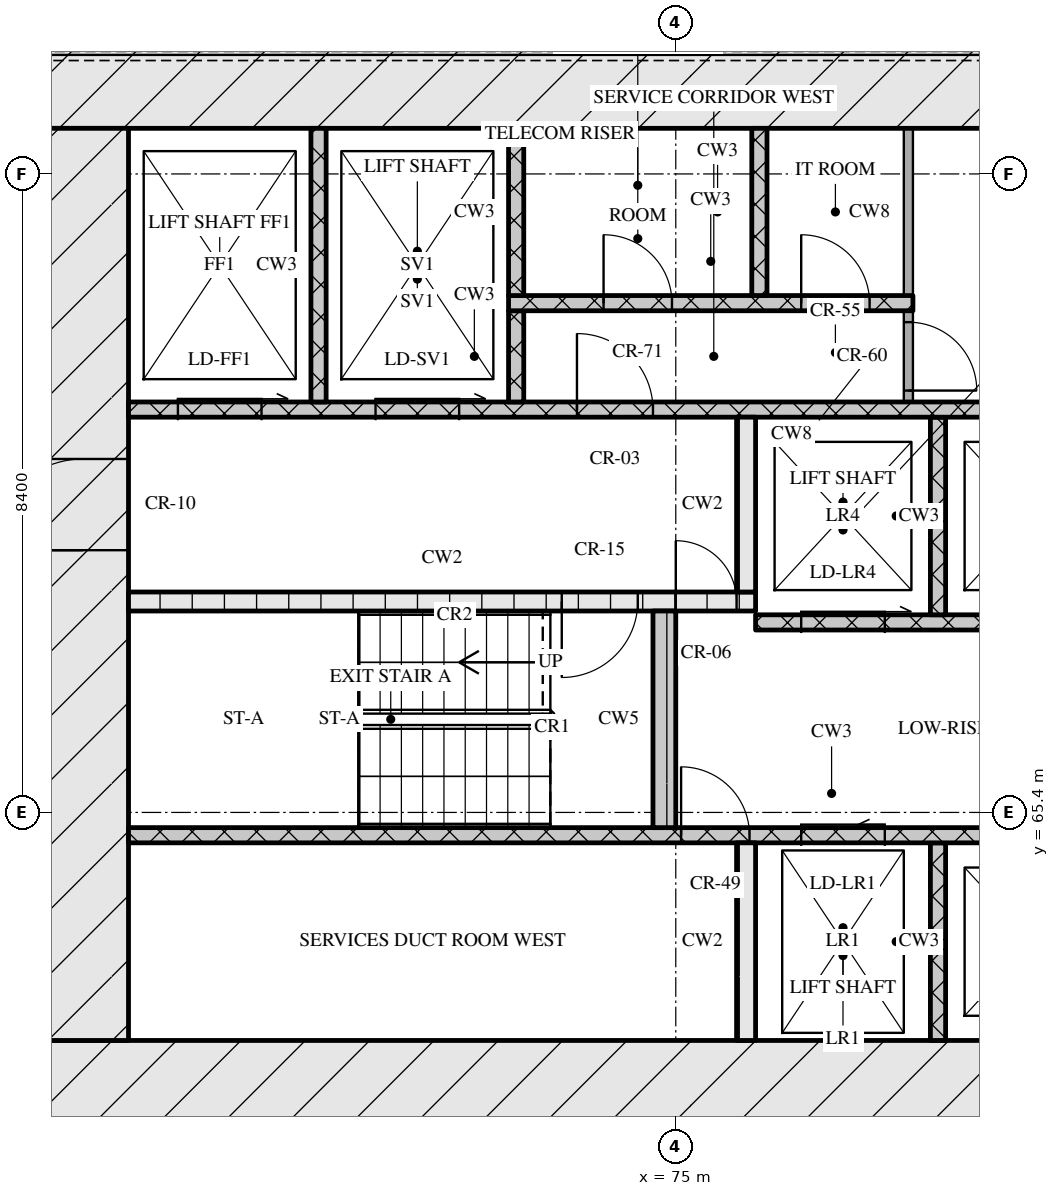
"""IFC4 building model, lengths in metres.
Left out: names, types, materials, properties, quantities, classifications, styles, units other than length and angle.
Written with IfcOpenShell. Run it as: python <this file> out.ifc"""

import sys

from ifc_helpers import new_model, si_unit, direction, frame, frame_2d, origin, place, context, subcontext, project, spatial, rectangle, extrude, element, fill, save


model = new_model("IFC4")
c1 = context("Model", 3, precision=1e-05, world=origin(), true_north=direction((0.0, 1.0)))
c2 = subcontext(c1, "Body", "Model", "MODEL_VIEW")
j1 = project(units=[si_unit("LENGTHUNIT", "METRE"), si_unit("PLANEANGLEUNIT", "RADIAN")], contexts=[c1])
p1 = place(None, origin())
s1 = spatial("IfcSite", under=j1, at=p1, CompositionType="ELEMENT")
p2 = place(p1, origin())
s2 = spatial("IfcBuilding", under=s1, at=p2, CompositionType="ELEMENT")
p3 = place(p2, frame((0.0, 0.0, 73.2)))
s3 = spatial("IfcBuildingStorey", under=s2, at=p3, CompositionType="ELEMENT", Elevation=73.2)
p4 = place(p3, frame((66.6, 61.8, 0.0), z_axis=(0.0, 0.0, 1.0), x_axis=(1.0, 0.0, 0.0)))
e1 = element("IfcWall", 1, at=p4, inside=s3, PredefinedType="SOLIDWALL", context=c2, shape_type="SweptSolid", body=[
    extrude(rectangle(XDim=42.0, YDim=1.2, at=frame_2d((21.0, 0.0))), origin(), (0.0, 0.0, 1.0), 3.32),
])
p5 = place(p4, frame((21.35, 0.0, 0.0)))
e2 = element("IfcOpeningElement", 2, at=p5, cuts=e1, PredefinedType="OPENING", context=c2, shape_type="SweptSolid", body=[
    extrude(rectangle(XDim=1.8, YDim=2.1, at=frame_2d((0.9, 1.05))), frame((0.0, 0.61, 0.0), z_axis=(0.0, -1.0, 0.0), x_axis=(1.0, 0.0, 0.0)), (0.0, 0.0, 1.0), 1.22),
])
p6 = place(p3, frame((66.6, 75.0, 0.0), z_axis=(0.0, 0.0, 1.0), x_axis=(1.0, 0.0, 0.0)))
e3 = element("IfcWall", 3, at=p6, inside=s3, PredefinedType="SOLIDWALL", context=c2, shape_type="SweptSolid", body=[
    extrude(rectangle(XDim=42.0, YDim=1.2, at=frame_2d((21.0, 0.0))), origin(), (0.0, 0.0, 1.0), 3.32),
])
p7 = place(p3, frame((67.2, 62.4, 0.0), z_axis=(0.0, 0.0, 1.0), x_axis=(0.0, 1.0, 0.0)))
e4 = element("IfcWall", 4, at=p7, inside=s3, PredefinedType="SOLIDWALL", context=c2, shape_type="SweptSolid", body=[
    extrude(rectangle(XDim=12.0, YDim=1.2, at=frame_2d((6.0, 0.0))), origin(), (0.0, 0.0, 1.0), 3.32),
])
p8 = place(p7, frame((6.45, 0.0, 0.0)))
e5 = element("IfcOpeningElement", 5, at=p8, cuts=e4, PredefinedType="OPENING", context=c2, shape_type="SweptSolid", body=[
    extrude(rectangle(XDim=1.2, YDim=2.1, at=frame_2d((0.6, 1.05))), frame((0.0, 0.61, 0.0), z_axis=(0.0, -1.0, 0.0), x_axis=(1.0, 0.0, 0.0)), (0.0, 0.0, 1.0), 1.22),
])
p9 = place(p3, frame((75.925, 62.4, 0.0), z_axis=(0.0, 0.0, 1.0), x_axis=(0.0, 1.0, 0.0)))
e6 = element("IfcWall", 6, at=p9, inside=s3, PredefinedType="SOLIDWALL", context=c2, shape_type="SweptSolid", body=[
    extrude(rectangle(XDim=2.6, YDim=0.25, at=frame_2d((1.3, 0.0))), origin(), (0.0, 0.0, 1.0), 3.32),
])
p10 = place(p3, frame((78.45, 62.4, 0.0), z_axis=(0.0, 0.0, 1.0), x_axis=(0.0, 1.0, 0.0)))
e7 = element("IfcWall", 7, at=p10, inside=s3, PredefinedType="SOLIDWALL", context=c2, shape_type="SweptSolid", body=[
    extrude(rectangle(XDim=2.6, YDim=0.2, at=frame_2d((1.3, 0.0))), origin(), (0.0, 0.0, 1.0), 3.32),
])
p11 = place(p3, frame((67.8, 65.1, 0.0), z_axis=(0.0, 0.0, 1.0), x_axis=(1.0, 0.0, 0.0)))
e8 = element("IfcWall", 8, at=p11, inside=s3, PredefinedType="SOLIDWALL", context=c2, shape_type="SweptSolid", body=[
    extrude(rectangle(XDim=18.5, YDim=0.2, at=frame_2d((9.25, 0.0))), origin(), (0.0, 0.0, 1.0), 3.32),
])
p12 = place(p11, frame((7.27, 0.0, 0.0)))
e9 = element("IfcOpeningElement", 9, at=p12, cuts=e8, PredefinedType="OPENING", context=c2, shape_type="SweptSolid", body=[
    extrude(rectangle(XDim=0.9, YDim=2.1, at=frame_2d((0.45, 1.05))), frame((0.0, 0.11, 0.0), z_axis=(0.0, -1.0, 0.0), x_axis=(1.0, 0.0, 0.0)), (0.0, 0.0, 1.0), 0.22),
])
p13 = place(p11, frame((8.85, 0.0, 0.0)))
e10 = element("IfcOpeningElement", 10, at=p13, cuts=e8, PredefinedType="OPENING", context=c2, shape_type="SweptSolid", body=[
    extrude(rectangle(XDim=1.1, YDim=2.1, at=frame_2d((0.55, 1.05))), frame((0.0, 0.11, 0.0), z_axis=(0.0, -1.0, 0.0), x_axis=(1.0, 0.0, 0.0)), (0.0, 0.0, 1.0), 0.22),
])
p14 = place(p11, frame((11.35, 0.0, 0.0)))
e11 = element("IfcOpeningElement", 11, at=p14, cuts=e8, PredefinedType="OPENING", context=c2, shape_type="SweptSolid", body=[
    extrude(rectangle(XDim=1.1, YDim=2.1, at=frame_2d((0.55, 1.05))), frame((0.0, 0.11, 0.0), z_axis=(0.0, -1.0, 0.0), x_axis=(1.0, 0.0, 0.0)), (0.0, 0.0, 1.0), 0.22),
])
p15 = place(p11, frame((13.85, 0.0, 0.0)))
e12 = element("IfcOpeningElement", 12, at=p15, cuts=e8, PredefinedType="OPENING", context=c2, shape_type="SweptSolid", body=[
    extrude(rectangle(XDim=1.1, YDim=2.1, at=frame_2d((0.55, 1.05))), frame((0.0, 0.11, 0.0), z_axis=(0.0, -1.0, 0.0), x_axis=(1.0, 0.0, 0.0)), (0.0, 0.0, 1.0), 0.22),
])
p16 = place(p11, frame((16.7, 0.0, 0.0)))
e13 = element("IfcOpeningElement", 13, at=p16, cuts=e8, PredefinedType="OPENING", context=c2, shape_type="SweptSolid", body=[
    extrude(rectangle(XDim=0.9, YDim=2.1, at=frame_2d((0.45, 1.05))), frame((0.0, 0.11, 0.0), z_axis=(0.0, -1.0, 0.0), x_axis=(1.0, 0.0, 0.0)), (0.0, 0.0, 1.0), 0.22),
])
p17 = place(p3, frame((74.85, 65.2, 0.0), z_axis=(0.0, 0.0, 1.0), x_axis=(0.0, 1.0, 0.0)))
e14 = element("IfcWall", 14, at=p17, inside=s3, PredefinedType="SOLIDWALL", context=c2, shape_type="SweptSolid", body=[
    extrude(rectangle(XDim=2.85, YDim=0.3, at=frame_2d((1.425, 0.0))), origin(), (0.0, 0.0, 1.0), 3.32),
])
p18 = place(p3, frame((76.05, 67.9, 0.0), z_axis=(0.0, 0.0, 1.0), x_axis=(1.0, 0.0, 0.0)))
e15 = element("IfcWall", 15, at=p18, inside=s3, PredefinedType="SOLIDWALL", context=c2, shape_type="SweptSolid", body=[
    extrude(rectangle(XDim=23.1, YDim=0.2, at=frame_2d((11.55, 0.0))), origin(), (0.0, 0.0, 1.0), 3.32),
])
p19 = place(p18, frame((0.6, 0.0, 0.0)))
e16 = element("IfcOpeningElement", 16, at=p19, cuts=e15, PredefinedType="OPENING", context=c2, shape_type="SweptSolid", body=[
    extrude(rectangle(XDim=1.1, YDim=2.1, at=frame_2d((0.55, 1.05))), frame((0.0, 0.11, 0.0), z_axis=(0.0, -1.0, 0.0), x_axis=(1.0, 0.0, 0.0)), (0.0, 0.0, 1.0), 0.22),
])
p20 = place(p18, frame((3.1, 0.0, 0.0)))
e17 = element("IfcOpeningElement", 17, at=p20, cuts=e15, PredefinedType="OPENING", context=c2, shape_type="SweptSolid", body=[
    extrude(rectangle(XDim=1.1, YDim=2.1, at=frame_2d((0.55, 1.05))), frame((0.0, 0.11, 0.0), z_axis=(0.0, -1.0, 0.0), x_axis=(1.0, 0.0, 0.0)), (0.0, 0.0, 1.0), 0.22),
])
p21 = place(p18, frame((5.6, 0.0, 0.0)))
e18 = element("IfcOpeningElement", 18, at=p21, cuts=e15, PredefinedType="OPENING", context=c2, shape_type="SweptSolid", body=[
    extrude(rectangle(XDim=1.1, YDim=2.1, at=frame_2d((0.55, 1.05))), frame((0.0, 0.11, 0.0), z_axis=(0.0, -1.0, 0.0), x_axis=(1.0, 0.0, 0.0)), (0.0, 0.0, 1.0), 0.22),
])
p22 = place(p18, frame((8.45, 0.0, 0.0)))
e19 = element("IfcOpeningElement", 19, at=p22, cuts=e15, PredefinedType="OPENING", context=c2, shape_type="SweptSolid", body=[
    extrude(rectangle(XDim=0.9, YDim=2.1, at=frame_2d((0.45, 1.05))), frame((0.0, 0.11, 0.0), z_axis=(0.0, -1.0, 0.0), x_axis=(1.0, 0.0, 0.0)), (0.0, 0.0, 1.0), 0.22),
])
p23 = place(p18, frame((10.91, 0.0, 0.0)))
e20 = element("IfcOpeningElement", 20, at=p23, cuts=e15, PredefinedType="OPENING", context=c2, shape_type="SweptSolid", body=[
    extrude(rectangle(XDim=0.9, YDim=2.1, at=frame_2d((0.45, 1.05))), frame((0.0, 0.11, 0.0), z_axis=(0.0, -1.0, 0.0), x_axis=(1.0, 0.0, 0.0)), (0.0, 0.0, 1.0), 0.22),
])
p24 = place(p18, frame((13.55, 0.0, 0.0)))
e21 = element("IfcOpeningElement", 21, at=p24, cuts=e15, PredefinedType="OPENING", context=c2, shape_type="SweptSolid", body=[
    extrude(rectangle(XDim=1.0, YDim=2.1, at=frame_2d((0.5, 1.05))), frame((0.0, 0.11, 0.0), z_axis=(0.0, -1.0, 0.0), x_axis=(1.0, 0.0, 0.0)), (0.0, 0.0, 1.0), 0.22),
])
p25 = place(p3, frame((78.45, 68.0, 0.0), z_axis=(0.0, 0.0, 1.0), x_axis=(0.0, 1.0, 0.0)))
e22 = element("IfcWall", 22, at=p25, inside=s3, PredefinedType="SOLIDWALL", context=c2, shape_type="SweptSolid", body=[
    extrude(rectangle(XDim=2.6, YDim=0.2, at=frame_2d((1.3, 0.0))), origin(), (0.0, 0.0, 1.0), 3.32),
])
p26 = place(p3, frame((67.8, 68.175, 0.0), z_axis=(0.0, 0.0, 1.0), x_axis=(1.0, 0.0, 0.0)))
e23 = element("IfcWall", 23, at=p26, inside=s3, PredefinedType="SOLIDWALL", context=c2, shape_type="SweptSolid", body=[
    extrude(rectangle(XDim=8.25, YDim=0.25, at=frame_2d((4.125, 0.0))), origin(), (0.0, 0.0, 1.0), 3.32),
])
p27 = place(p26, frame((5.7, 0.0, 0.0)))
e24 = element("IfcOpeningElement", 24, at=p27, cuts=e23, PredefinedType="OPENING", context=c2, shape_type="SweptSolid", body=[
    extrude(rectangle(XDim=1.0, YDim=2.1, at=frame_2d((0.5, 1.05))), frame((0.0, 0.135, 0.0), z_axis=(0.0, -1.0, 0.0), x_axis=(1.0, 0.0, 0.0)), (0.0, 0.0, 1.0), 0.27),
])
p28 = place(p26, frame((7.2, 0.0, 0.0)))
e25 = element("IfcOpeningElement", 25, at=p28, cuts=e23, PredefinedType="OPENING", context=c2, shape_type="SweptSolid", body=[
    extrude(rectangle(XDim=0.8, YDim=2.1, at=frame_2d((0.4, 1.05))), frame((0.0, 0.135, 0.0), z_axis=(0.0, -1.0, 0.0), x_axis=(1.0, 0.0, 0.0)), (0.0, 0.0, 1.0), 0.27),
])
p29 = place(p3, frame((75.925, 68.3, 0.0), z_axis=(0.0, 0.0, 1.0), x_axis=(0.0, 1.0, 0.0)))
e26 = element("IfcWall", 26, at=p29, inside=s3, PredefinedType="SOLIDWALL", context=c2, shape_type="SweptSolid", body=[
    extrude(rectangle(XDim=2.3, YDim=0.25, at=frame_2d((1.15, 0.0))), origin(), (0.0, 0.0, 1.0), 3.32),
])
p30 = place(p3, frame((67.8, 70.7, 0.0), z_axis=(0.0, 0.0, 1.0), x_axis=(1.0, 0.0, 0.0)))
e27 = element("IfcWall", 27, at=p30, inside=s3, PredefinedType="SOLIDWALL", context=c2, shape_type="SweptSolid", body=[
    extrude(rectangle(XDim=39.6, YDim=0.2, at=frame_2d((19.8, 0.0))), origin(), (0.0, 0.0, 1.0), 3.32),
])
p31 = place(p30, frame((0.65, 0.0, 0.0)))
e28 = element("IfcOpeningElement", 28, at=p31, cuts=e27, PredefinedType="OPENING", context=c2, shape_type="SweptSolid", body=[
    extrude(rectangle(XDim=1.1, YDim=2.1, at=frame_2d((0.55, 1.05))), frame((0.0, 0.11, 0.0), z_axis=(0.0, -1.0, 0.0), x_axis=(1.0, 0.0, 0.0)), (0.0, 0.0, 1.0), 0.22),
])
p32 = place(p30, frame((3.25, 0.0, 0.0)))
e29 = element("IfcOpeningElement", 29, at=p32, cuts=e27, PredefinedType="OPENING", context=c2, shape_type="SweptSolid", body=[
    extrude(rectangle(XDim=1.1, YDim=2.1, at=frame_2d((0.55, 1.05))), frame((0.0, 0.11, 0.0), z_axis=(0.0, -1.0, 0.0), x_axis=(1.0, 0.0, 0.0)), (0.0, 0.0, 1.0), 0.22),
])
p33 = place(p30, frame((5.9, 0.0, 0.0)))
e30 = element("IfcOpeningElement", 30, at=p33, cuts=e27, PredefinedType="OPENING", context=c2, shape_type="SweptSolid", body=[
    extrude(rectangle(XDim=1.0, YDim=2.1, at=frame_2d((0.5, 1.05))), frame((0.0, 0.11, 0.0), z_axis=(0.0, -1.0, 0.0), x_axis=(1.0, 0.0, 0.0)), (0.0, 0.0, 1.0), 0.22),
])
p34 = place(p30, frame((21.7, 0.0, 0.0)))
e31 = element("IfcOpeningElement", 31, at=p34, cuts=e27, PredefinedType="OPENING", context=c2, shape_type="SweptSolid", body=[
    extrude(rectangle(XDim=1.0, YDim=2.1, at=frame_2d((0.5, 1.05))), frame((0.0, 0.11, 0.0), z_axis=(0.0, -1.0, 0.0), x_axis=(1.0, 0.0, 0.0)), (0.0, 0.0, 1.0), 0.22),
])
p35 = place(p30, frame((32.7, 0.0, 0.0)))
e32 = element("IfcOpeningElement", 32, at=p35, cuts=e27, PredefinedType="OPENING", context=c2, shape_type="SweptSolid", body=[
    extrude(rectangle(XDim=1.0, YDim=2.1, at=frame_2d((0.5, 1.05))), frame((0.0, 0.11, 0.0), z_axis=(0.0, -1.0, 0.0), x_axis=(1.0, 0.0, 0.0)), (0.0, 0.0, 1.0), 0.22),
])
p36 = place(p30, frame((35.25, 0.0, 0.0)))
e33 = element("IfcOpeningElement", 33, at=p36, cuts=e27, PredefinedType="OPENING", context=c2, shape_type="SweptSolid", body=[
    extrude(rectangle(XDim=1.1, YDim=2.1, at=frame_2d((0.55, 1.05))), frame((0.0, 0.11, 0.0), z_axis=(0.0, -1.0, 0.0), x_axis=(1.0, 0.0, 0.0)), (0.0, 0.0, 1.0), 0.22),
])
p37 = place(p30, frame((37.85, 0.0, 0.0)))
e34 = element("IfcOpeningElement", 34, at=p37, cuts=e27, PredefinedType="OPENING", context=c2, shape_type="SweptSolid", body=[
    extrude(rectangle(XDim=1.1, YDim=2.1, at=frame_2d((0.55, 1.05))), frame((0.0, 0.11, 0.0), z_axis=(0.0, -1.0, 0.0), x_axis=(1.0, 0.0, 0.0)), (0.0, 0.0, 1.0), 0.22),
])
p38 = place(p3, frame((70.3, 70.8, 0.0), z_axis=(0.0, 0.0, 1.0), x_axis=(0.0, 1.0, 0.0)))
e35 = element("IfcWall", 35, at=p38, inside=s3, PredefinedType="SOLIDWALL", context=c2, shape_type="SweptSolid", body=[
    extrude(rectangle(XDim=3.6, YDim=0.2, at=frame_2d((1.8, 0.0))), origin(), (0.0, 0.0, 1.0), 3.32),
])
p39 = place(p3, frame((72.9, 70.8, 0.0), z_axis=(0.0, 0.0, 1.0), x_axis=(0.0, 1.0, 0.0)))
e36 = element("IfcWall", 36, at=p39, inside=s3, PredefinedType="SOLIDWALL", context=c2, shape_type="SweptSolid", body=[
    extrude(rectangle(XDim=1.2, YDim=0.2, at=frame_2d((0.6, 0.0))), origin(), (0.0, 0.0, 1.0), 3.32),
])
p40 = place(p3, frame((78.06, 70.8, 0.0), z_axis=(0.0, 0.0, 1.0), x_axis=(0.0, 1.0, 0.0)))
e37 = element("IfcWall", 37, at=p40, inside=s3, PredefinedType="PARTITIONING", context=c2, shape_type="SweptSolid", body=[
    extrude(rectangle(XDim=1.2, YDim=0.12, at=frame_2d((0.6, 0.0))), origin(), (0.0, 0.0, 1.0), 3.32),
])
p41 = place(p40, frame((0.15, 0.0, 0.0)))
e38 = element("IfcOpeningElement", 38, at=p41, cuts=e37, PredefinedType="OPENING", context=c2, shape_type="SweptSolid", body=[
    extrude(rectangle(XDim=0.9, YDim=2.1, at=frame_2d((0.45, 1.05))), frame((0.0, 0.07, 0.0), z_axis=(0.0, -1.0, 0.0), x_axis=(1.0, 0.0, 0.0)), (0.0, 0.0, 1.0), 0.14),
])
p42 = place(p3, frame((72.8, 72.1, 0.0), z_axis=(0.0, 0.0, 1.0), x_axis=(1.0, 0.0, 0.0)))
e39 = element("IfcWall", 39, at=p42, inside=s3, PredefinedType="SOLIDWALL", context=c2, shape_type="SweptSolid", body=[
    extrude(rectangle(XDim=5.32, YDim=0.2, at=frame_2d((2.66, 0.0))), origin(), (0.0, 0.0, 1.0), 3.32),
])
p43 = place(p42, frame((1.25, 0.0, 0.0)))
e40 = element("IfcOpeningElement", 40, at=p43, cuts=e39, PredefinedType="OPENING", context=c2, shape_type="SweptSolid", body=[
    extrude(rectangle(XDim=0.9, YDim=2.1, at=frame_2d((0.45, 1.05))), frame((0.0, 0.11, 0.0), z_axis=(0.0, -1.0, 0.0), x_axis=(1.0, 0.0, 0.0)), (0.0, 0.0, 1.0), 0.22),
])
p44 = place(p42, frame((3.85, 0.0, 0.0)))
e41 = element("IfcOpeningElement", 41, at=p44, cuts=e39, PredefinedType="OPENING", context=c2, shape_type="SweptSolid", body=[
    extrude(rectangle(XDim=0.9, YDim=2.1, at=frame_2d((0.45, 1.05))), frame((0.0, 0.11, 0.0), z_axis=(0.0, -1.0, 0.0), x_axis=(1.0, 0.0, 0.0)), (0.0, 0.0, 1.0), 0.22),
])
for number, where, z_axis, x_axis in (
    (42, (72.9, 72.2, 0.0), (0.0, 0.0, 1.0), (0.0, 1.0, 0.0)),
    (43, (76.1, 72.2, 0.0), (0.0, 0.0, 1.0), (0.0, 1.0, 0.0)),
):
    element("IfcWall", number, at=place(p3, frame(where, z_axis=z_axis, x_axis=x_axis)), inside=s3, PredefinedType="SOLIDWALL", context=c2, shape_type="SweptSolid", body=[
        extrude(rectangle(XDim=2.2, YDim=0.2, at=frame_2d((1.1, 0.0))), origin(), (0.0, 0.0, 1.0), 3.32),
    ])
p45 = place(p3, frame((78.06, 72.2, 0.0), z_axis=(0.0, 0.0, 1.0), x_axis=(0.0, 1.0, 0.0)))
e44 = element("IfcWall", 44, at=p45, inside=s3, PredefinedType="PARTITIONING", context=c2, shape_type="SweptSolid", body=[
    extrude(rectangle(XDim=2.2, YDim=0.12, at=frame_2d((1.1, 0.0))), origin(), (0.0, 0.0, 1.0), 3.32),
])
p46 = place(p12, origin())
e45 = element("IfcDoor", 45, at=p46, inside=s3, OperationType="SINGLE_SWING_LEFT", PredefinedType="DOOR", context=c2, shape_type="SweptSolid", body=[
    extrude(rectangle(XDim=0.9, YDim=2.1, at=frame_2d((0.45, 1.05))), frame((0.0, 0.025, 0.0), z_axis=(0.0, -1.0, 0.0), x_axis=(1.0, 0.0, 0.0)), (0.0, 0.0, 1.0), 0.05),
])
fill(e9, e45)
p47 = place(p13, origin())
e46 = element("IfcDoor", 46, at=p47, inside=s3, OperationType="SLIDING_TO_LEFT", PredefinedType="DOOR", context=c2, shape_type="SweptSolid", body=[
    extrude(rectangle(XDim=1.1, YDim=2.1, at=frame_2d((0.55, 1.05))), frame((0.0, 0.025, 0.0), z_axis=(0.0, -1.0, 0.0), x_axis=(1.0, 0.0, 0.0)), (0.0, 0.0, 1.0), 0.05),
])
fill(e10, e46)
p48 = place(p19, origin())
e47 = element("IfcDoor", 47, at=p48, inside=s3, OperationType="SLIDING_TO_RIGHT", PredefinedType="DOOR", context=c2, shape_type="SweptSolid", body=[
    extrude(rectangle(XDim=1.1, YDim=2.1, at=frame_2d((0.55, 1.05))), frame((0.0, 0.025, 0.0), z_axis=(0.0, -1.0, 0.0), x_axis=(1.0, 0.0, 0.0)), (0.0, 0.0, 1.0), 0.05),
])
fill(e16, e47)
p49 = place(p27, origin())
e48 = element("IfcDoor", 48, at=p49, inside=s3, OperationType="SINGLE_SWING_RIGHT", PredefinedType="DOOR", context=c2, shape_type="SweptSolid", body=[
    extrude(rectangle(XDim=1.0, YDim=2.1, at=frame_2d((0.5, 1.05))), frame((0.0, 0.025, 0.0), z_axis=(0.0, -1.0, 0.0), x_axis=(1.0, 0.0, 0.0)), (0.0, 0.0, 1.0), 0.05),
])
fill(e24, e48)
p50 = place(p28, origin())
e49 = element("IfcDoor", 49, at=p50, inside=s3, OperationType="SINGLE_SWING_LEFT", PredefinedType="DOOR", context=c2, shape_type="SweptSolid", body=[
    extrude(rectangle(XDim=0.8, YDim=2.1, at=frame_2d((0.4, 1.05))), frame((0.0, 0.025, 0.0), z_axis=(0.0, -1.0, 0.0), x_axis=(1.0, 0.0, 0.0)), (0.0, 0.0, 1.0), 0.05),
])
fill(e25, e49)
p51 = place(p8, origin())
e50 = element("IfcDoor", 50, at=p51, inside=s3, OperationType="SINGLE_SWING_LEFT", PredefinedType="DOOR", context=c2, shape_type="SweptSolid", body=[
    extrude(rectangle(XDim=1.2, YDim=2.1, at=frame_2d((0.6, 1.05))), frame((0.0, 0.025, 0.0), z_axis=(0.0, -1.0, 0.0), x_axis=(1.0, 0.0, 0.0)), (0.0, 0.0, 1.0), 0.05),
])
fill(e5, e50)
p52 = place(p31, origin())
e51 = element("IfcDoor", 51, at=p52, inside=s3, OperationType="SLIDING_TO_RIGHT", PredefinedType="DOOR", context=c2, shape_type="SweptSolid", body=[
    extrude(rectangle(XDim=1.1, YDim=2.1, at=frame_2d((0.55, 1.05))), frame((0.0, 0.025, 0.0), z_axis=(0.0, -1.0, 0.0), x_axis=(1.0, 0.0, 0.0)), (0.0, 0.0, 1.0), 0.05),
])
fill(e28, e51)
p53 = place(p32, origin())
e52 = element("IfcDoor", 52, at=p53, inside=s3, OperationType="SLIDING_TO_RIGHT", PredefinedType="DOOR", context=c2, shape_type="SweptSolid", body=[
    extrude(rectangle(XDim=1.1, YDim=2.1, at=frame_2d((0.55, 1.05))), frame((0.0, 0.025, 0.0), z_axis=(0.0, -1.0, 0.0), x_axis=(1.0, 0.0, 0.0)), (0.0, 0.0, 1.0), 0.05),
])
fill(e29, e52)
p54 = place(p33, origin())
e53 = element("IfcDoor", 53, at=p54, inside=s3, OperationType="SINGLE_SWING_LEFT", PredefinedType="DOOR", context=c2, shape_type="SweptSolid", body=[
    extrude(rectangle(XDim=1.0, YDim=2.1, at=frame_2d((0.5, 1.05))), frame((0.0, 0.025, 0.0), z_axis=(0.0, -1.0, 0.0), x_axis=(1.0, 0.0, 0.0)), (0.0, 0.0, 1.0), 0.05),
])
fill(e30, e53)
p55 = place(p41, origin())
e54 = element("IfcDoor", 54, at=p55, inside=s3, OperationType="SINGLE_SWING_RIGHT", PredefinedType="DOOR", context=c2, shape_type="SweptSolid", body=[
    extrude(rectangle(XDim=0.9, YDim=2.1, at=frame_2d((0.45, 1.05))), frame((0.0, 0.025, 0.0), z_axis=(0.0, -1.0, 0.0), x_axis=(1.0, 0.0, 0.0)), (0.0, 0.0, 1.0), 0.05),
])
fill(e38, e54)
p56 = place(p43, origin())
e55 = element("IfcDoor", 55, at=p56, inside=s3, OperationType="SINGLE_SWING_LEFT", PredefinedType="DOOR", context=c2, shape_type="SweptSolid", body=[
    extrude(rectangle(XDim=0.9, YDim=2.1, at=frame_2d((0.45, 1.05))), frame((0.0, 0.025, 0.0), z_axis=(0.0, -1.0, 0.0), x_axis=(1.0, 0.0, 0.0)), (0.0, 0.0, 1.0), 0.05),
])
fill(e40, e55)
p57 = place(p44, origin())
e56 = element("IfcDoor", 56, at=p57, inside=s3, OperationType="SINGLE_SWING_LEFT", PredefinedType="DOOR", context=c2, shape_type="SweptSolid", body=[
    extrude(rectangle(XDim=0.9, YDim=2.1, at=frame_2d((0.45, 1.05))), frame((0.0, 0.025, 0.0), z_axis=(0.0, -1.0, 0.0), x_axis=(1.0, 0.0, 0.0)), (0.0, 0.0, 1.0), 0.05),
])
fill(e41, e56)
save(model, sys.argv[1])
